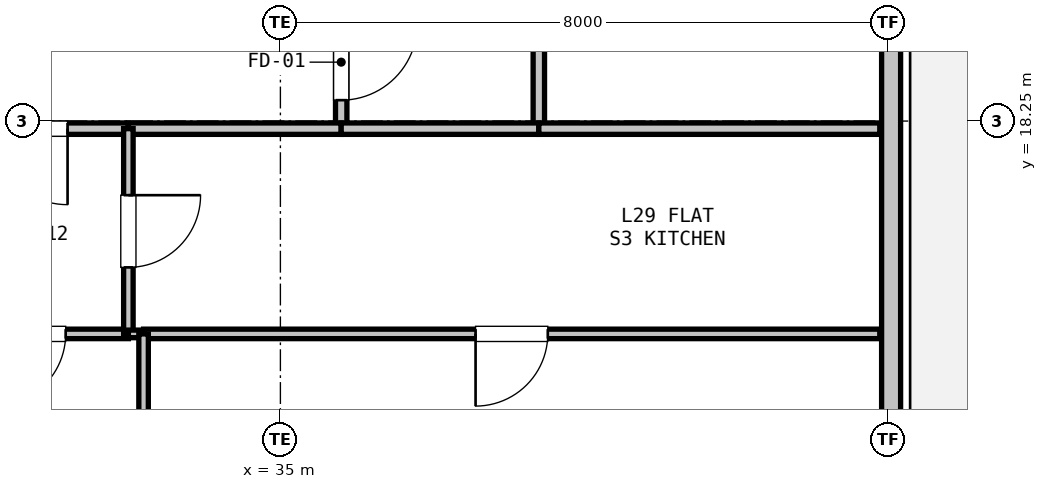
"""IFC4 building model, lengths in metres.
Left out: names, types, materials, properties, quantities, classifications, styles, units other than length and angle.
Written with IfcOpenShell. Run it as: python <this file> out.ifc"""

import sys

from ifc_helpers import new_model, si_unit, direction, frame, frame_2d, origin, place, context, subcontext, project, spatial, rectangle, extrude, element, fill, save


model = new_model("IFC4")
c1 = context("Model", 3, precision=1e-05, world=origin(), true_north=direction((0.0, 1.0)))
c2 = subcontext(c1, "Body", "Model", "MODEL_VIEW")
j1 = project(units=[si_unit("LENGTHUNIT", "METRE"), si_unit("PLANEANGLEUNIT", "RADIAN")], contexts=[c1])
p1 = place(None, origin())
s1 = spatial("IfcSite", under=j1, at=p1, CompositionType="ELEMENT")
p2 = place(p1, origin())
s2 = spatial("IfcBuilding", under=s1, at=p2, CompositionType="ELEMENT")
p3 = place(p2, frame((0.0, 0.0, 106.5)))
s3 = spatial("IfcBuildingStorey", under=s2, at=p3, CompositionType="ELEMENT", Elevation=106.5)
p4 = place(p3, frame((43.035, 19.435, 0.0), z_axis=(0.0, 0.0, 1.0), x_axis=(0.0, -1.0, 0.0)))
e1 = element("IfcWall", 1, at=p4, inside=s3, PredefinedType="SOLIDWALL", context=c2, shape_type="SweptSolid", body=[
    extrude(rectangle(XDim=11.93, YDim=0.25, at=frame_2d((5.965, 0.0))), origin(), (0.0, 0.0, 1.0), 2.67),
])
p5 = place(p4, frame((7.941, 0.0, 0.9)))
e2 = element("IfcOpeningElement", 2, at=p5, cuts=e1, PredefinedType="OPENING", context=c2, shape_type="SweptSolid", body=[
    extrude(rectangle(XDim=0.9, YDim=1.4, at=frame_2d((0.45, 0.7))), frame((0.0, 0.135, 0.0), z_axis=(0.0, -1.0, 0.0), x_axis=(1.0, 0.0, 0.0)), (0.0, 0.0, 1.0), 0.27),
])
p6 = place(p3, frame((35.8, 19.9, 0.0), z_axis=(0.0, 0.0, 1.0), x_axis=(0.0, -1.0, 0.0)))
e3 = element("IfcWall", 3, at=p6, inside=s3, PredefinedType="PARTITIONING", context=c2, shape_type="SweptSolid", body=[
    extrude(rectangle(XDim=1.75, YDim=0.15, at=frame_2d((0.875, 0.0))), origin(), (0.0, 0.0, 1.0), 3.05),
])
p7 = place(p6, frame((0.375, 0.0, 0.0)))
e4 = element("IfcOpeningElement", 4, at=p7, cuts=e3, PredefinedType="OPENING", context=c2, shape_type="SweptSolid", body=[
    extrude(rectangle(XDim=1.0, YDim=2.15, at=frame_2d((0.5, 1.075))), frame((0.0, 0.085, 0.0), z_axis=(0.0, -1.0, 0.0), x_axis=(1.0, 0.0, 0.0)), (0.0, 0.0, 1.0), 0.17),
])
p8 = place(p3, frame((35.8, 18.15, 0.0), z_axis=(0.0, 0.0, 1.0), x_axis=(-1.0, 0.0, 0.0)))
e5 = element("IfcWall", 5, at=p8, inside=s3, PredefinedType="PARTITIONING", context=c2, shape_type="SweptSolid", body=[
    extrude(rectangle(XDim=2.8, YDim=0.15, at=frame_2d((1.4, 0.0))), origin(), (0.0, 0.0, 1.0), 3.05),
])
p9 = place(p3, frame((33.0, 18.15, 0.0), z_axis=(0.0, 0.0, 1.0), x_axis=(-1.0, 0.0, 0.0)))
e6 = element("IfcWall", 6, at=p9, inside=s3, PredefinedType="PARTITIONING", context=c2, shape_type="SweptSolid", body=[
    extrude(rectangle(XDim=2.6, YDim=0.15, at=frame_2d((1.3, 0.0))), origin(), (0.0, 0.0, 1.0), 3.05),
])
p10 = place(p9, frame((0.8, 0.0, 0.0)))
e7 = element("IfcOpeningElement", 7, at=p10, cuts=e6, PredefinedType="OPENING", context=c2, shape_type="SweptSolid", body=[
    extrude(rectangle(XDim=1.0, YDim=2.15, at=frame_2d((0.5, 1.075))), frame((0.0, 0.085, 0.0), z_axis=(0.0, -1.0, 0.0), x_axis=(1.0, 0.0, 0.0)), (0.0, 0.0, 1.0), 0.17),
])
p11 = place(p3, frame((38.4, 21.4, 0.0), z_axis=(0.0, 0.0, 1.0), x_axis=(0.0, -1.0, 0.0)))
e8 = element("IfcWall", 8, at=p11, inside=s3, PredefinedType="PARTITIONING", context=c2, shape_type="SweptSolid", body=[
    extrude(rectangle(XDim=3.25, YDim=0.15, at=frame_2d((1.625, 0.0))), origin(), (0.0, 0.0, 1.0), 3.05),
])
p12 = place(p3, frame((38.4, 18.15, 0.0), z_axis=(0.0, 0.0, 1.0), x_axis=(-1.0, 0.0, 0.0)))
e9 = element("IfcWall", 9, at=p12, inside=s3, PredefinedType="PARTITIONING", context=c2, shape_type="SweptSolid", body=[
    extrude(rectangle(XDim=2.6, YDim=0.15, at=frame_2d((1.3, 0.0))), origin(), (0.0, 0.0, 1.0), 2.423),
])
p13 = place(p3, frame((33.0, 15.45, 0.0), z_axis=(0.0, 0.0, 1.0), x_axis=(-1.0, 0.0, 0.0)))
e10 = element("IfcWall", 10, at=p13, inside=s3, PredefinedType="PARTITIONING", context=c2, shape_type="SweptSolid", body=[
    extrude(rectangle(XDim=2.6, YDim=0.125, at=frame_2d((1.3, 0.0))), origin(), (0.0, 0.0, 1.0), 3.05),
])
p14 = place(p13, frame((0.825, 0.0, 0.0)))
e11 = element("IfcOpeningElement", 11, at=p14, cuts=e10, PredefinedType="OPENING", context=c2, shape_type="SweptSolid", body=[
    extrude(rectangle(XDim=0.95, YDim=2.1, at=frame_2d((0.475, 1.05))), frame((0.0, 0.073, 0.0), z_axis=(0.0, -1.0, 0.0), x_axis=(1.0, 0.0, 0.0)), (0.0, 0.0, 1.0), 0.145),
])
p15 = place(p3, frame((33.0, 18.15, 0.0), z_axis=(0.0, 0.0, 1.0), x_axis=(0.0, -1.0, 0.0)))
e12 = element("IfcWall", 12, at=p15, inside=s3, PredefinedType="PARTITIONING", context=c2, shape_type="SweptSolid", body=[
    extrude(rectangle(XDim=2.7, YDim=0.125, at=frame_2d((1.35, 0.0))), origin(), (0.0, 0.0, 1.0), 3.05),
])
p16 = place(p15, frame((0.875, 0.0, 0.0)))
e13 = element("IfcOpeningElement", 13, at=p16, cuts=e12, PredefinedType="OPENING", context=c2, shape_type="SweptSolid", body=[
    extrude(rectangle(XDim=0.95, YDim=2.1, at=frame_2d((0.475, 1.05))), frame((0.0, 0.073, 0.0), z_axis=(0.0, -1.0, 0.0), x_axis=(1.0, 0.0, 0.0)), (0.0, 0.0, 1.0), 0.145),
])
p17 = place(p3, frame((38.4, 18.15, 0.0), z_axis=(0.0, 0.0, 1.0), x_axis=(1.0, 0.0, 0.0)))
e14 = element("IfcWall", 14, at=p17, inside=s3, PredefinedType="PARTITIONING", context=c2, shape_type="SweptSolid", body=[
    extrude(rectangle(XDim=4.486, YDim=0.15, at=frame_2d((2.243, 0.0))), origin(), (0.0, 0.0, 1.0), 2.365),
])
p18 = place(p3, frame((42.885, 15.45, 0.0), z_axis=(0.0, 0.0, 1.0), x_axis=(-1.0, 0.0, 0.0)))
e15 = element("IfcWall", 15, at=p18, inside=s3, PredefinedType="PARTITIONING", context=c2, shape_type="SweptSolid", body=[
    extrude(rectangle(XDim=9.686, YDim=0.125, at=frame_2d((4.843, 0.0))), origin(), (0.0, 0.0, 1.0), 2.365),
])
p19 = place(p18, frame((4.368, 0.0, 0.0)))
e16 = element("IfcOpeningElement", 16, at=p19, cuts=e15, PredefinedType="OPENING", context=c2, shape_type="SweptSolid", body=[
    extrude(rectangle(XDim=0.95, YDim=2.1, at=frame_2d((0.475, 1.05))), frame((0.0, 0.073, 0.0), z_axis=(0.0, -1.0, 0.0), x_axis=(1.0, 0.0, 0.0)), (0.0, 0.0, 1.0), 0.145),
])
p20 = place(p3, frame((33.2, 15.45, 0.0), z_axis=(0.0, 0.0, 1.0), x_axis=(-1.0, 0.0, 0.0)))
e17 = element("IfcWall", 17, at=p20, inside=s3, PredefinedType="PARTITIONING", context=c2, shape_type="SweptSolid", body=[
    extrude(rectangle(XDim=0.2, YDim=0.1, at=frame_2d((0.1, 0.0))), origin(), (0.0, 0.0, 1.0), 3.05),
])
p21 = place(p3, frame((33.2, 15.45, 0.0), z_axis=(0.0, 0.0, 1.0), x_axis=(0.0, -1.0, 0.0)))
e18 = element("IfcWall", 18, at=p21, inside=s3, PredefinedType="PARTITIONING", context=c2, shape_type="SweptSolid", body=[
    extrude(rectangle(XDim=5.28, YDim=0.125, at=frame_2d((2.64, 0.0))), origin(), (0.0, 0.0, 1.0), 3.05),
])
p22 = place(p21, frame((2.165, 0.0, 0.0)))
e19 = element("IfcOpeningElement", 19, at=p22, cuts=e18, PredefinedType="OPENING", context=c2, shape_type="SweptSolid", body=[
    extrude(rectangle(XDim=0.95, YDim=2.1, at=frame_2d((0.475, 1.05))), frame((0.0, 0.073, 0.0), z_axis=(0.0, -1.0, 0.0), x_axis=(1.0, 0.0, 0.0)), (0.0, 0.0, 1.0), 0.145),
])
p23 = place(p7, origin())
e20 = element("IfcDoor", 20, at=p23, inside=s3, OperationType="SINGLE_SWING_LEFT", PredefinedType="DOOR", context=c2, shape_type="SweptSolid", body=[
    extrude(rectangle(XDim=1.0, YDim=2.15, at=frame_2d((0.5, 1.075))), frame((0.0, 0.025, 0.0), z_axis=(0.0, -1.0, 0.0), x_axis=(1.0, 0.0, 0.0)), (0.0, 0.0, 1.0), 0.05),
])
fill(e4, e20)
p24 = place(p10, origin())
e21 = element("IfcDoor", 21, at=p24, inside=s3, OperationType="SINGLE_SWING_LEFT", PredefinedType="DOOR", context=c2, shape_type="SweptSolid", body=[
    extrude(rectangle(XDim=1.0, YDim=2.15, at=frame_2d((0.5, 1.075))), frame((0.0, 0.025, 0.0), z_axis=(0.0, -1.0, 0.0), x_axis=(1.0, 0.0, 0.0)), (0.0, 0.0, 1.0), 0.05),
])
fill(e7, e21)
p25 = place(p16, origin())
e22 = element("IfcDoor", 22, at=p25, inside=s3, OperationType="SINGLE_SWING_LEFT", PredefinedType="DOOR", context=c2, shape_type="SweptSolid", body=[
    extrude(rectangle(XDim=0.95, YDim=2.1, at=frame_2d((0.475, 1.05))), frame((0.0, 0.025, 0.0), z_axis=(0.0, -1.0, 0.0), x_axis=(1.0, 0.0, 0.0)), (0.0, 0.0, 1.0), 0.05),
])
fill(e13, e22)
p26 = place(p14, origin())
e23 = element("IfcDoor", 23, at=p26, inside=s3, OperationType="SINGLE_SWING_RIGHT", PredefinedType="DOOR", context=c2, shape_type="SweptSolid", body=[
    extrude(rectangle(XDim=0.95, YDim=2.1, at=frame_2d((0.475, 1.05))), frame((0.0, 0.025, 0.0), z_axis=(0.0, -1.0, 0.0), x_axis=(1.0, 0.0, 0.0)), (0.0, 0.0, 1.0), 0.05),
])
fill(e11, e23)
p27 = place(p19, origin())
e24 = element("IfcDoor", 24, at=p27, inside=s3, OperationType="SINGLE_SWING_RIGHT", PredefinedType="DOOR", context=c2, shape_type="SweptSolid", body=[
    extrude(rectangle(XDim=0.95, YDim=2.1, at=frame_2d((0.475, 1.05))), frame((0.0, 0.025, 0.0), z_axis=(0.0, -1.0, 0.0), x_axis=(1.0, 0.0, 0.0)), (0.0, 0.0, 1.0), 0.05),
])
fill(e16, e24)
save(model, sys.argv[1])
